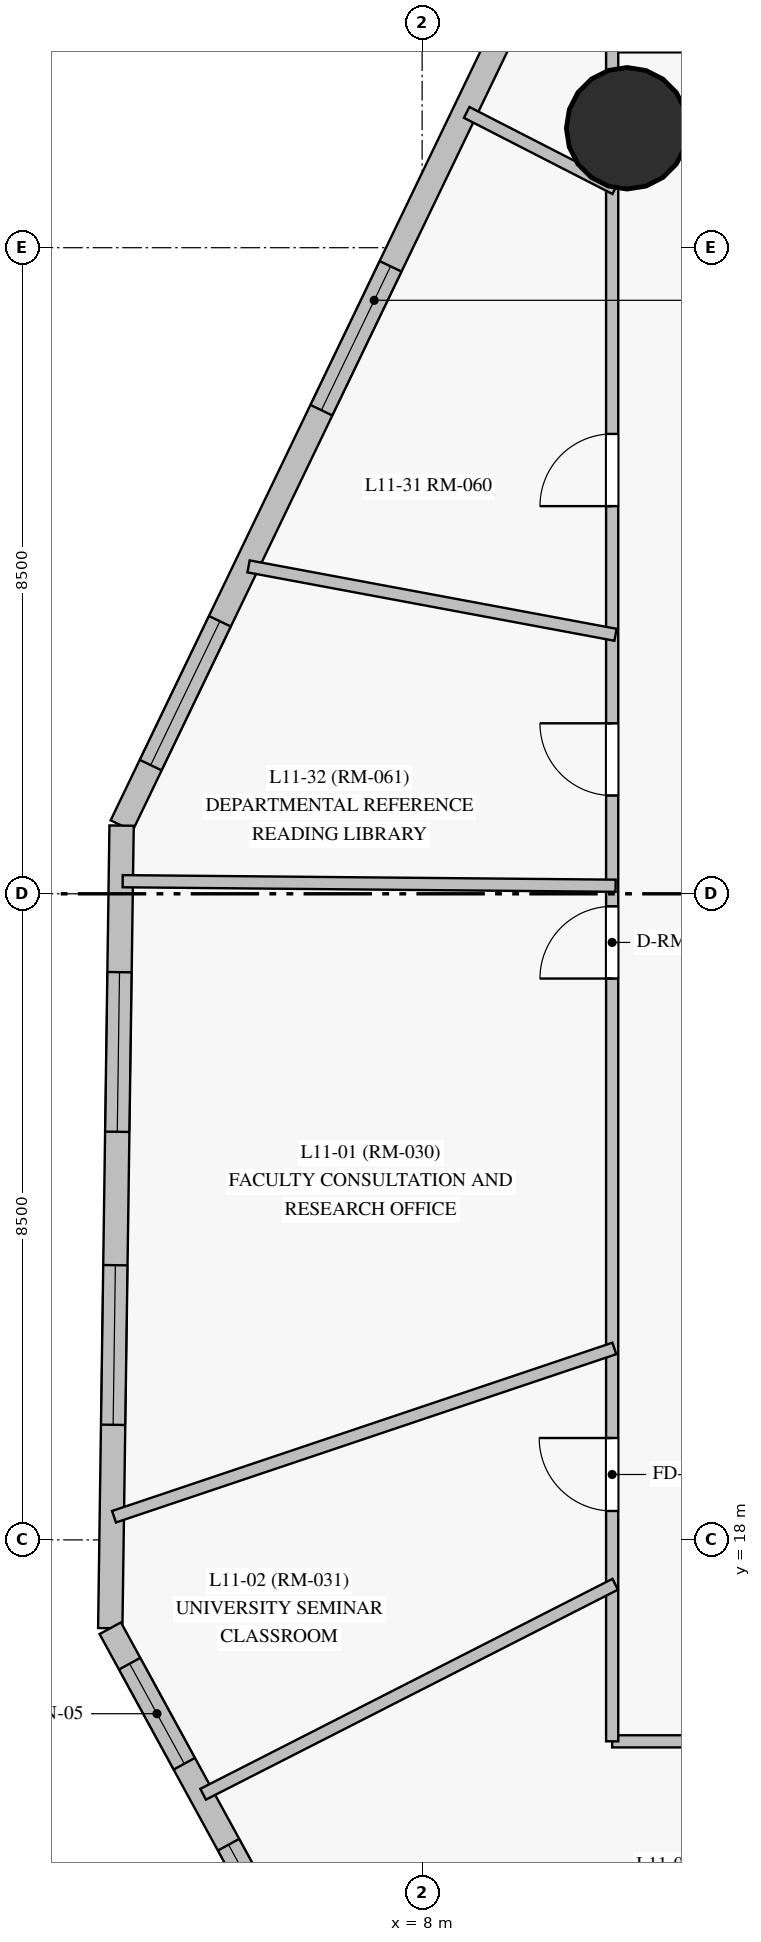
"""IFC4 building model, lengths in metres.
Left out: names, types, materials, properties, quantities, classifications, styles, units other than length and angle.
Written with IfcOpenShell. Run it as: python <this file> out.ifc"""

import sys

from ifc_helpers import new_model, si_unit, direction, frame, frame_2d, origin, origin_with_axes, origin_2d, place, context, subcontext, project, spatial, rectangle, circle, extrude, source, transform, mapped, element, fill, save


model = new_model("IFC4")
c1 = context("Model", 3, precision=1e-05, world=origin(), true_north=direction((0.0, 1.0)))
c2 = subcontext(c1, "Body", "Model", "MODEL_VIEW")
j1 = project(units=[si_unit("LENGTHUNIT", "METRE"), si_unit("PLANEANGLEUNIT", "RADIAN")], contexts=[c1])
p1 = place(None, origin())
s1 = spatial("IfcSite", under=j1, at=p1, CompositionType="ELEMENT")
p2 = place(p1, origin())
s2 = spatial("IfcBuilding", under=s1, at=p2, CompositionType="ELEMENT")
p3 = place(p2, frame((0.0, 0.0, 44.5)))
s3 = spatial("IfcBuildingStorey", under=s2, at=p3, CompositionType="ELEMENT", Elevation=44.5)
m1 = source(origin_with_axes(), c2, "Body", "SweptSolid", [
    extrude(circle(Radius=0.8, at=origin_2d()), origin(), (0.0, 0.0, 1.0), 3.6),
])
p4 = place(p3, frame((10.697, 36.571, 0.0), z_axis=(0.0, 0.0, 1.0), x_axis=(1.0, 0.0, 0.0)))
e1 = element("IfcColumn", 1, at=p4, inside=s3, PredefinedType="COLUMN", context=c2, shape_type="MappedRepresentation", body=[
    mapped(m1, transform((0.0, 0.0, 0.0), scale=1.0)),
])
p5 = place(p3, frame((10.694, 41.219, 0.0), z_axis=(0.0, 0.0, 1.0), x_axis=(-0.433433173731, -0.901185710001, 0.0)))
e2 = element("IfcWall", 2, at=p5, inside=s3, PredefinedType="SOLIDWALL", context=c2, shape_type="SweptSolid", body=[
    extrude(rectangle(XDim=15.337, YDim=0.32, at=frame_2d((7.669, 0.0))), origin(), (0.0, 0.0, 1.0), 3.35),
])
p6 = place(p5, frame((1.437, 0.0, 0.85)))
e3 = element("IfcOpeningElement", 3, at=p6, cuts=e2, PredefinedType="OPENING", context=c2, shape_type="SweptSolid", body=[
    extrude(rectangle(XDim=2.1, YDim=1.95, at=frame_2d((1.05, 0.975))), frame((0.0, 0.17, 0.0), z_axis=(0.0, -1.0, 0.0), x_axis=(1.0, 0.0, 0.0)), (0.0, 0.0, 1.0), 0.34),
])
p7 = place(p5, frame((7.173, 0.0, 0.85)))
e4 = element("IfcOpeningElement", 4, at=p7, cuts=e2, PredefinedType="OPENING", context=c2, shape_type="SweptSolid", body=[
    extrude(rectangle(XDim=2.1, YDim=1.95, at=frame_2d((1.05, 0.975))), frame((0.0, 0.17, 0.0), z_axis=(0.0, -1.0, 0.0), x_axis=(1.0, 0.0, 0.0)), (0.0, 0.0, 1.0), 0.34),
])
p8 = place(p5, frame((12.354, 0.0, 0.85)))
e5 = element("IfcOpeningElement", 5, at=p8, cuts=e2, PredefinedType="OPENING", context=c2, shape_type="SweptSolid", body=[
    extrude(rectangle(XDim=2.1, YDim=1.95, at=frame_2d((1.05, 0.975))), frame((0.0, 0.17, 0.0), z_axis=(0.0, -1.0, 0.0), x_axis=(1.0, 0.0, 0.0)), (0.0, 0.0, 1.0), 0.34),
])
p9 = place(p3, frame((4.046, 27.397, 0.0), z_axis=(0.0, 0.0, 1.0), x_axis=(-0.014125758113, -0.999900226501, 0.0)))
e6 = element("IfcWall", 6, at=p9, inside=s3, PredefinedType="SOLIDWALL", context=c2, shape_type="SweptSolid", body=[
    extrude(rectangle(XDim=10.56, YDim=0.32, at=frame_2d((5.28, 0.0))), origin(), (0.0, 0.0, 1.0), 3.35),
])
p10 = place(p9, frame((1.928, 0.0, 0.85)))
e7 = element("IfcOpeningElement", 7, at=p10, cuts=e6, PredefinedType="OPENING", context=c2, shape_type="SweptSolid", body=[
    extrude(rectangle(XDim=2.1, YDim=1.95, at=frame_2d((1.05, 0.975))), frame((0.0, 0.17, 0.0), z_axis=(0.0, -1.0, 0.0), x_axis=(1.0, 0.0, 0.0)), (0.0, 0.0, 1.0), 0.34),
])
p11 = place(p9, frame((5.784, 0.0, 0.85)))
e8 = element("IfcOpeningElement", 8, at=p11, cuts=e6, PredefinedType="OPENING", context=c2, shape_type="SweptSolid", body=[
    extrude(rectangle(XDim=2.1, YDim=1.95, at=frame_2d((1.05, 0.975))), frame((0.0, 0.17, 0.0), z_axis=(0.0, -1.0, 0.0), x_axis=(1.0, 0.0, 0.0)), (0.0, 0.0, 1.0), 0.34),
])
p12 = place(p3, frame((3.897, 16.838, 0.0), z_axis=(0.0, 0.0, 1.0), x_axis=(0.479531833204, -0.877524484527, 0.0)))
e9 = element("IfcWall", 9, at=p12, inside=s3, PredefinedType="SOLIDWALL", context=c2, shape_type="SweptSolid", body=[
    extrude(rectangle(XDim=7.674, YDim=0.32, at=frame_2d((3.837, 0.0))), origin(), (0.0, 0.0, 1.0), 3.35),
])
p13 = place(p12, frame((0.532, 0.0, 0.85)))
e10 = element("IfcOpeningElement", 10, at=p13, cuts=e9, PredefinedType="OPENING", context=c2, shape_type="SweptSolid", body=[
    extrude(rectangle(XDim=1.5, YDim=1.85, at=frame_2d((0.75, 0.925))), frame((0.0, 0.17, 0.0), z_axis=(0.0, -1.0, 0.0), x_axis=(1.0, 0.0, 0.0)), (0.0, 0.0, 1.0), 0.34),
])
p14 = place(p12, frame((3.246, 0.0, 0.85)))
e11 = element("IfcOpeningElement", 11, at=p14, cuts=e9, PredefinedType="OPENING", context=c2, shape_type="SweptSolid", body=[
    extrude(rectangle(XDim=2.1, YDim=1.95, at=frame_2d((1.05, 0.975))), frame((0.0, 0.17, 0.0), z_axis=(0.0, -1.0, 0.0), x_axis=(1.0, 0.0, 0.0)), (0.0, 0.0, 1.0), 0.34),
])
p15 = place(p3, frame((40.25, 15.35, 0.0), z_axis=(0.0, 0.0, 1.0), x_axis=(-1.0, 0.0, 0.0)))
e12 = element("IfcWall", 12, at=p15, inside=s3, PredefinedType="PARTITIONING", context=c2, shape_type="SweptSolid", body=[
    extrude(rectangle(XDim=29.75, YDim=0.16, at=frame_2d((14.875, 0.0))), origin(), (0.0, 0.0, 1.0), 2.7),
])
p16 = place(p15, frame((26.423, 0.0, 0.0)))
e13 = element("IfcOpeningElement", 13, at=p16, cuts=e12, PredefinedType="OPENING", context=c2, shape_type="SweptSolid", body=[
    extrude(rectangle(XDim=0.95, YDim=2.15, at=frame_2d((0.475, 1.075))), frame((0.0, 0.09, 0.0), z_axis=(0.0, -1.0, 0.0), x_axis=(1.0, 0.0, 0.0)), (0.0, 0.0, 1.0), 0.18),
])
p17 = place(p15, frame((21.837, 0.0, 0.0)))
e14 = element("IfcOpeningElement", 14, at=p17, cuts=e12, PredefinedType="OPENING", context=c2, shape_type="SweptSolid", body=[
    extrude(rectangle(XDim=0.95, YDim=2.15, at=frame_2d((0.475, 1.075))), frame((0.0, 0.09, 0.0), z_axis=(0.0, -1.0, 0.0), x_axis=(1.0, 0.0, 0.0)), (0.0, 0.0, 1.0), 0.18),
])
p18 = place(p15, frame((18.863, 0.0, 0.0)))
e15 = element("IfcOpeningElement", 15, at=p18, cuts=e12, PredefinedType="OPENING", context=c2, shape_type="SweptSolid", body=[
    extrude(rectangle(XDim=0.95, YDim=2.15, at=frame_2d((0.475, 1.075))), frame((0.0, 0.09, 0.0), z_axis=(0.0, -1.0, 0.0), x_axis=(1.0, 0.0, 0.0)), (0.0, 0.0, 1.0), 0.18),
])
p19 = place(p15, frame((16.388, 0.0, 0.0)))
e16 = element("IfcOpeningElement", 16, at=p19, cuts=e12, PredefinedType="OPENING", context=c2, shape_type="SweptSolid", body=[
    extrude(rectangle(XDim=0.95, YDim=2.15, at=frame_2d((0.475, 1.075))), frame((0.0, 0.09, 0.0), z_axis=(0.0, -1.0, 0.0), x_axis=(1.0, 0.0, 0.0)), (0.0, 0.0, 1.0), 0.18),
])
p20 = place(p15, frame((14.4, 0.0, 0.0)))
e17 = element("IfcOpeningElement", 17, at=p20, cuts=e12, PredefinedType="OPENING", context=c2, shape_type="SweptSolid", body=[
    extrude(rectangle(XDim=0.95, YDim=2.15, at=frame_2d((0.475, 1.075))), frame((0.0, 0.09, 0.0), z_axis=(0.0, -1.0, 0.0), x_axis=(1.0, 0.0, 0.0)), (0.0, 0.0, 1.0), 0.18),
])
p21 = place(p15, frame((12.118, 0.0, 0.0)))
e18 = element("IfcOpeningElement", 18, at=p21, cuts=e12, PredefinedType="OPENING", context=c2, shape_type="SweptSolid", body=[
    extrude(rectangle(XDim=0.95, YDim=2.15, at=frame_2d((0.475, 1.075))), frame((0.0, 0.09, 0.0), z_axis=(0.0, -1.0, 0.0), x_axis=(1.0, 0.0, 0.0)), (0.0, 0.0, 1.0), 0.18),
])
p22 = place(p15, frame((9.938, 0.0, 0.0)))
e19 = element("IfcOpeningElement", 19, at=p22, cuts=e12, PredefinedType="OPENING", context=c2, shape_type="SweptSolid", body=[
    extrude(rectangle(XDim=0.95, YDim=2.15, at=frame_2d((0.475, 1.075))), frame((0.0, 0.09, 0.0), z_axis=(0.0, -1.0, 0.0), x_axis=(1.0, 0.0, 0.0)), (0.0, 0.0, 1.0), 0.18),
])
p23 = place(p15, frame((6.962, 0.0, 0.0)))
e20 = element("IfcOpeningElement", 20, at=p23, cuts=e12, PredefinedType="OPENING", context=c2, shape_type="SweptSolid", body=[
    extrude(rectangle(XDim=0.95, YDim=2.15, at=frame_2d((0.475, 1.075))), frame((0.0, 0.09, 0.0), z_axis=(0.0, -1.0, 0.0), x_axis=(1.0, 0.0, 0.0)), (0.0, 0.0, 1.0), 0.18),
])
p24 = place(p3, frame((10.5, 37.65, 0.0), z_axis=(0.0, 0.0, 1.0), x_axis=(1.0, 0.0, 0.0)))
e21 = element("IfcWall", 21, at=p24, inside=s3, PredefinedType="PARTITIONING", context=c2, shape_type="SweptSolid", body=[
    extrude(rectangle(XDim=29.75, YDim=0.16, at=frame_2d((14.875, 0.0))), origin(), (0.0, 0.0, 1.0), 2.75),
])
p25 = place(p24, frame((21.927, 0.0, 0.0)))
e22 = element("IfcOpeningElement", 22, at=p25, cuts=e21, PredefinedType="OPENING", context=c2, shape_type="SweptSolid", body=[
    extrude(rectangle(XDim=0.95, YDim=2.15, at=frame_2d((0.475, 1.075))), frame((0.0, 0.09, 0.0), z_axis=(0.0, -1.0, 0.0), x_axis=(1.0, 0.0, 0.0)), (0.0, 0.0, 1.0), 0.18),
])
p26 = place(p24, frame((20.262, 0.0, 0.0)))
e23 = element("IfcOpeningElement", 23, at=p26, cuts=e21, PredefinedType="OPENING", context=c2, shape_type="SweptSolid", body=[
    extrude(rectangle(XDim=0.95, YDim=2.15, at=frame_2d((0.475, 1.075))), frame((0.0, 0.09, 0.0), z_axis=(0.0, -1.0, 0.0), x_axis=(1.0, 0.0, 0.0)), (0.0, 0.0, 1.0), 0.18),
])
p27 = place(p24, frame((18.722, 0.0, 0.0)))
e24 = element("IfcOpeningElement", 24, at=p27, cuts=e21, PredefinedType="OPENING", context=c2, shape_type="SweptSolid", body=[
    extrude(rectangle(XDim=0.95, YDim=2.15, at=frame_2d((0.475, 1.075))), frame((0.0, 0.09, 0.0), z_axis=(0.0, -1.0, 0.0), x_axis=(1.0, 0.0, 0.0)), (0.0, 0.0, 1.0), 0.18),
])
p28 = place(p24, frame((14.4, 0.0, 0.0)))
e25 = element("IfcOpeningElement", 25, at=p28, cuts=e21, PredefinedType="OPENING", context=c2, shape_type="SweptSolid", body=[
    extrude(rectangle(XDim=0.95, YDim=2.15, at=frame_2d((0.475, 1.075))), frame((0.0, 0.09, 0.0), z_axis=(0.0, -1.0, 0.0), x_axis=(1.0, 0.0, 0.0)), (0.0, 0.0, 1.0), 0.18),
])
p29 = place(p24, frame((6.962, 0.0, 0.0)))
e26 = element("IfcOpeningElement", 26, at=p29, cuts=e21, PredefinedType="OPENING", context=c2, shape_type="SweptSolid", body=[
    extrude(rectangle(XDim=0.95, YDim=2.15, at=frame_2d((0.475, 1.075))), frame((0.0, 0.09, 0.0), z_axis=(0.0, -1.0, 0.0), x_axis=(1.0, 0.0, 0.0)), (0.0, 0.0, 1.0), 0.18),
])
p30 = place(p3, frame((10.5, 15.35, 0.0), z_axis=(0.0, 0.0, 1.0), x_axis=(0.0, 1.0, 0.0)))
e27 = element("IfcWall", 27, at=p30, inside=s3, PredefinedType="PARTITIONING", context=c2, shape_type="SweptSolid", body=[
    extrude(rectangle(XDim=22.3, YDim=0.16, at=frame_2d((11.15, 0.0))), origin(), (0.0, 0.0, 1.0), 2.75),
])
p31 = place(p30, frame((10.035, 0.0, 0.0)))
e28 = element("IfcOpeningElement", 28, at=p31, cuts=e27, PredefinedType="OPENING", context=c2, shape_type="SweptSolid", body=[
    extrude(rectangle(XDim=0.95, YDim=2.15, at=frame_2d((0.475, 1.075))), frame((0.0, 0.09, 0.0), z_axis=(0.0, -1.0, 0.0), x_axis=(1.0, 0.0, 0.0)), (0.0, 0.0, 1.0), 0.18),
])
p32 = place(p30, frame((3.031, 0.0, 0.0)))
e29 = element("IfcOpeningElement", 29, at=p32, cuts=e27, PredefinedType="OPENING", context=c2, shape_type="SweptSolid", body=[
    extrude(rectangle(XDim=0.96, YDim=2.15, at=frame_2d((0.48, 1.075))), frame((0.0, 0.09, 0.0), z_axis=(0.0, -1.0, 0.0), x_axis=(1.0, 0.0, 0.0)), (0.0, 0.0, 1.0), 0.18),
])
p33 = place(p30, frame((16.25, 0.0, 0.0)))
e30 = element("IfcOpeningElement", 30, at=p33, cuts=e27, PredefinedType="OPENING", context=c2, shape_type="SweptSolid", body=[
    extrude(rectangle(XDim=0.95, YDim=2.15, at=frame_2d((0.475, 1.075))), frame((0.0, 0.09, 0.0), z_axis=(0.0, -1.0, 0.0), x_axis=(1.0, 0.0, 0.0)), (0.0, 0.0, 1.0), 0.18),
])
p34 = place(p30, frame((12.443, 0.0, 0.0)))
e31 = element("IfcOpeningElement", 31, at=p34, cuts=e27, PredefinedType="OPENING", context=c2, shape_type="SweptSolid", body=[
    extrude(rectangle(XDim=0.95, YDim=2.15, at=frame_2d((0.475, 1.075))), frame((0.0, 0.09, 0.0), z_axis=(0.0, -1.0, 0.0), x_axis=(1.0, 0.0, 0.0)), (0.0, 0.0, 1.0), 0.18),
])
p35 = place(p3, frame((16.404, 15.381, 0.0), z_axis=(0.0, 0.0, 1.0), x_axis=(-0.733733824599, -0.679437027722, 0.0)))
e32 = element("IfcWall", 32, at=p35, inside=s3, PredefinedType="PARTITIONING", context=c2, shape_type="SweptSolid", body=[
    extrude(rectangle(XDim=8.898, YDim=0.16, at=frame_2d((4.449, 0.0))), origin(), (0.0, 0.0, 1.0), 3.35),
])
p36 = place(p3, frame((10.528, 20.519, 0.0), z_axis=(0.0, 0.0, 1.0), x_axis=(-0.947825559391, -0.318789442994, 0.0)))
e33 = element("IfcWall", 33, at=p36, inside=s3, PredefinedType="PARTITIONING", context=c2, shape_type="SweptSolid", body=[
    extrude(rectangle(XDim=6.945, YDim=0.16, at=frame_2d((3.472, 0.0))), origin(), (0.0, 0.0, 1.0), 3.35),
])
p37 = place(p3, frame((4.061, 26.666, 0.0), z_axis=(0.0, 0.0, 1.0), x_axis=(0.999957461163, -0.009223657919, 0.0)))
e34 = element("IfcWall", 34, at=p37, inside=s3, PredefinedType="PARTITIONING", context=c2, shape_type="SweptSolid", body=[
    extrude(rectangle(XDim=6.485, YDim=0.16, at=frame_2d((3.242, 0.0))), origin(), (0.0, 0.0, 1.0), 3.35),
])
p38 = place(p3, frame((10.54, 17.416, 0.0), z_axis=(0.0, 0.0, 1.0), x_axis=(-0.890998767968, -0.454005721857, 0.0)))
e35 = element("IfcWall", 35, at=p38, inside=s3, PredefinedType="PARTITIONING", context=c2, shape_type="SweptSolid", body=[
    extrude(rectangle(XDim=6.085, YDim=0.16, at=frame_2d((3.042, 0.0))), origin(), (0.0, 0.0, 1.0), 3.35),
])
p39 = place(p3, frame((10.544, 29.908, 0.0), z_axis=(0.0, 0.0, 1.0), x_axis=(-0.983076994719, 0.183192855906, 0.0)))
e36 = element("IfcWall", 36, at=p39, inside=s3, PredefinedType="PARTITIONING", context=c2, shape_type="SweptSolid", body=[
    extrude(rectangle(XDim=4.911, YDim=0.16, at=frame_2d((2.456, 0.0))), origin(), (0.0, 0.0, 1.0), 3.35),
])
p40 = place(p3, frame((10.54, 35.778, 0.0), z_axis=(0.0, 0.0, 1.0), x_axis=(-0.889845240462, 0.456262477119, 0.0)))
e37 = element("IfcWall", 37, at=p40, inside=s3, PredefinedType="PARTITIONING", context=c2, shape_type="SweptSolid", body=[
    extrude(rectangle(XDim=2.196, YDim=0.16, at=frame_2d((1.098, 0.0))), origin(), (0.0, 0.0, 1.0), 3.35),
])
m2 = source(origin_with_axes(), c2, "Body", "SweptSolid", [
    extrude(rectangle(XDim=2.1, YDim=1.95, at=frame_2d((1.05, 0.975))), frame((0.0, 0.03, 0.0), z_axis=(0.0, -1.0, 0.0), x_axis=(1.0, 0.0, 0.0)), (0.0, 0.0, 1.0), 0.06),
])
p41 = place(p7, origin())
e38 = element("IfcWindow", 38, at=p41, inside=s3, PartitioningType="SINGLE_PANEL", PredefinedType="WINDOW", context=c2, shape_type="MappedRepresentation", body=[
    mapped(m2, transform((0.0, 0.0, 0.0), scale=1.0)),
])
fill(e4, e38)
p42 = place(p8, origin())
e39 = element("IfcWindow", 39, at=p42, inside=s3, PartitioningType="SINGLE_PANEL", PredefinedType="WINDOW", context=c2, shape_type="MappedRepresentation", body=[
    mapped(m2, transform((0.0, 0.0, 0.0), scale=1.0)),
])
fill(e5, e39)
p43 = place(p10, origin())
e40 = element("IfcWindow", 40, at=p43, inside=s3, PartitioningType="SINGLE_PANEL", PredefinedType="WINDOW", context=c2, shape_type="MappedRepresentation", body=[
    mapped(m2, transform((0.0, 0.0, 0.0), scale=1.0)),
])
fill(e7, e40)
p44 = place(p11, origin())
e41 = element("IfcWindow", 41, at=p44, inside=s3, PartitioningType="SINGLE_PANEL", PredefinedType="WINDOW", context=c2, shape_type="MappedRepresentation", body=[
    mapped(m2, transform((0.0, 0.0, 0.0), scale=1.0)),
])
fill(e8, e41)
m3 = source(origin_with_axes(), c2, "Body", "SweptSolid", [
    extrude(rectangle(XDim=1.5, YDim=1.85, at=frame_2d((0.75, 0.925))), frame((0.0, 0.03, 0.0), z_axis=(0.0, -1.0, 0.0), x_axis=(1.0, 0.0, 0.0)), (0.0, 0.0, 1.0), 0.06),
])
p45 = place(p13, origin())
e42 = element("IfcWindow", 42, at=p45, inside=s3, PartitioningType="SINGLE_PANEL", PredefinedType="WINDOW", context=c2, shape_type="MappedRepresentation", body=[
    mapped(m3, transform((0.0, 0.0, 0.0), scale=1.0)),
])
fill(e10, e42)
p46 = place(p14, origin())
e43 = element("IfcWindow", 43, at=p46, inside=s3, PartitioningType="SINGLE_PANEL", PredefinedType="WINDOW", context=c2, shape_type="MappedRepresentation", body=[
    mapped(m2, transform((0.0, 0.0, 0.0), scale=1.0)),
])
fill(e11, e43)
m4 = source(origin_with_axes(), c2, "Body", "SweptSolid", [
    extrude(rectangle(XDim=0.95, YDim=2.15, at=frame_2d((0.475, 1.075))), frame((0.0, 0.025, 0.0), z_axis=(0.0, -1.0, 0.0), x_axis=(1.0, 0.0, 0.0)), (0.0, 0.0, 1.0), 0.05),
])
p47 = place(p31, origin())
e44 = element("IfcDoor", 44, at=p47, inside=s3, OperationType="SINGLE_SWING_LEFT", PredefinedType="DOOR", context=c2, shape_type="MappedRepresentation", body=[
    mapped(m4, transform((0.0, 0.0, 0.0), scale=1.0)),
])
fill(e28, e44)
m5 = source(origin_with_axes(), c2, "Body", "SweptSolid", [
    extrude(rectangle(XDim=0.96, YDim=2.15, at=frame_2d((0.48, 1.075))), frame((0.0, 0.025, 0.0), z_axis=(0.0, -1.0, 0.0), x_axis=(1.0, 0.0, 0.0)), (0.0, 0.0, 1.0), 0.05),
])
p48 = place(p32, origin())
e45 = element("IfcDoor", 45, at=p48, inside=s3, OperationType="SINGLE_SWING_RIGHT", PredefinedType="DOOR", context=c2, shape_type="MappedRepresentation", body=[
    mapped(m5, transform((0.0, 0.0, 0.0), scale=1.0)),
])
fill(e29, e45)
p49 = place(p33, origin())
e46 = element("IfcDoor", 46, at=p49, inside=s3, OperationType="SINGLE_SWING_LEFT", PredefinedType="DOOR", context=c2, shape_type="MappedRepresentation", body=[
    mapped(m4, transform((0.0, 0.0, 0.0), scale=1.0)),
])
fill(e30, e46)
p50 = place(p34, origin())
e47 = element("IfcDoor", 47, at=p50, inside=s3, OperationType="SINGLE_SWING_RIGHT", PredefinedType="DOOR", context=c2, shape_type="MappedRepresentation", body=[
    mapped(m4, transform((0.0, 0.0, 0.0), scale=1.0)),
])
fill(e31, e47)
save(model, sys.argv[1])
